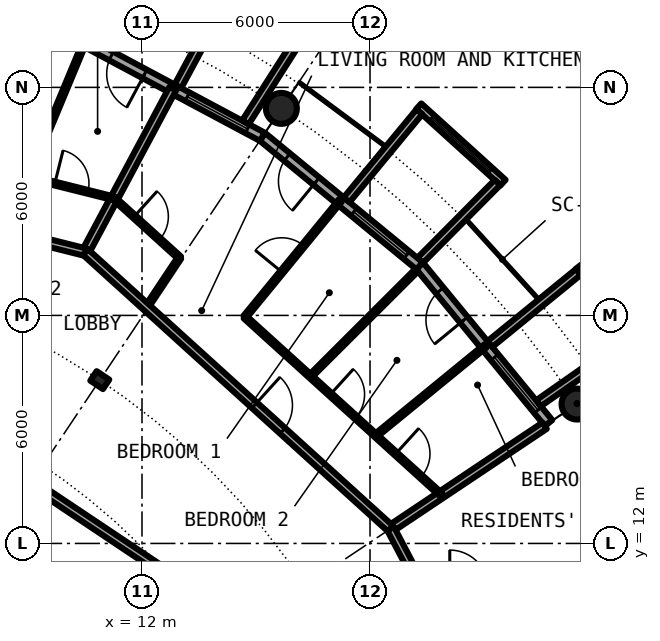
"""IFC4 building model, lengths in metres.
Left out: names, types, materials, properties, quantities, classifications, styles, units other than length and angle.
Written with IfcOpenShell. Run it as: python <this file> out.ifc"""

import sys

from ifc_helpers import new_model, si_unit, direction, frame, frame_2d, origin, origin_2d, place, context, subcontext, project, spatial, rectangle, circle, hollow_circle, i_section, extrude, element, fill, save


model = new_model("IFC4")
c1 = context("Model", 3, precision=1e-05, world=origin(), true_north=direction((0.0, 1.0)))
c2 = subcontext(c1, "Body", "Model", "MODEL_VIEW")
j1 = project(units=[si_unit("LENGTHUNIT", "METRE"), si_unit("PLANEANGLEUNIT", "RADIAN")], contexts=[c1])
p1 = place(None, origin())
s1 = spatial("IfcSite", under=j1, at=p1, CompositionType="ELEMENT")
p2 = place(p1, origin())
s2 = spatial("IfcBuilding", under=s1, at=p2, CompositionType="ELEMENT")
p3 = place(p2, frame((0.0, 0.0, 199.35)))
s3 = spatial("IfcBuildingStorey", under=s2, at=p3, CompositionType="ELEMENT", Elevation=199.35)
for number, where, z_axis, x_axis in (
    (1, (23.448, 15.667, 0.0), (0.0, 0.0, 1.0), (1.0, 0.0, 0.0)),
    (2, (15.667, 23.448, 0.0), (0.0, 0.0, 1.0), (1.0, 0.0, 0.0)),
):
    element("IfcColumn", number, at=place(p3, frame(where, z_axis=z_axis, x_axis=x_axis)), inside=s3, PredefinedType="COLUMN", context=c2, shape_type="SweptSolid", body=[
        extrude(hollow_circle(Radius=0.406, WallThickness=0.03, at=origin_2d()), origin(), (0.0, 0.0, 1.0), 3.05),
    ])
p4 = place(p3, frame((10.889, 16.297, 0.0), z_axis=(0.0, 0.0, 1.0), x_axis=(0.55557023302, 0.831469612303, 0.0)))
e3 = element("IfcColumn", 3, at=p4, inside=s3, PredefinedType="COLUMN", context=c2, shape_type="SweptSolid", body=[
    extrude(i_section(OverallWidth=0.3, OverallDepth=0.4, WebThickness=0.013, FlangeThickness=0.024, FilletRadius=0.027, at=origin_2d()), origin(), (0.0, 0.0, 1.0), 3.05),
])
p5 = place(p3, frame((22.699, 15.167, 0.0), z_axis=(0.0, 0.0, 1.0), x_axis=(-0.634382322723, 0.773019449054, 0.0)))
e4 = element("IfcWall", 4, at=p5, inside=s3, PredefinedType="SOLIDWALL", context=c2, shape_type="SweptSolid", body=[
    extrude(rectangle(XDim=5.352, YDim=0.25, at=frame_2d((2.676, 0.0))), origin(), (0.0, 0.0, 1.0), 2.7),
])
p6 = place(p5, frame((0.441, 0.0, 0.3)))
e5 = element("IfcOpeningElement", 5, at=p6, cuts=e4, PredefinedType="OPENING", context=c2, shape_type="SweptSolid", body=[
    extrude(rectangle(XDim=1.8, YDim=2.1, at=frame_2d((0.9, 1.05))), frame((0.0, 0.135, 0.0), z_axis=(0.0, -1.0, 0.0), x_axis=(1.0, 0.0, 0.0)), (0.0, 0.0, 1.0), 0.27),
])
p7 = place(p5, frame((3.51, 0.0, 0.0)))
e6 = element("IfcOpeningElement", 6, at=p7, cuts=e4, PredefinedType="OPENING", context=c2, shape_type="SweptSolid", body=[
    extrude(rectangle(XDim=1.0, YDim=2.2, at=frame_2d((0.5, 1.1))), frame((0.0, 0.135, 0.0), z_axis=(0.0, -1.0, 0.0), x_axis=(1.0, 0.0, 0.0)), (0.0, 0.0, 1.0), 0.27),
])
p8 = place(p3, frame((24.972, 17.337, -0.03), z_axis=(0.0, 0.0, 1.0), x_axis=(-0.602806268067, 0.797887588059, 0.0)))
e7 = element("IfcWall", 7, at=p8, inside=s3, PredefinedType="SOLIDWALL", context=c2, shape_type="SweptSolid", body=[
    extrude(rectangle(XDim=2.447, YDim=0.2, at=frame_2d((1.223, 0.0))), origin(), (0.0, 0.0, 1.0), 2.73),
])
p9 = place(p8, frame((0.183, 0.0, 0.33)))
e8 = element("IfcOpeningElement", 8, at=p9, cuts=e7, PredefinedType="OPENING", context=c2, shape_type="SweptSolid", body=[
    extrude(circle(Radius=1.04, at=frame_2d((1.04, 1.04))), frame((0.0, 0.11, 0.0), z_axis=(0.0, -1.0, 0.0), x_axis=(1.0, 0.0, 0.0)), (0.0, 0.0, 1.0), 0.22),
])
p10 = place(p3, frame((22.433, 15.688, -0.03), z_axis=(0.0, 0.0, 1.0), x_axis=(0.819373043115, 0.573260687834, 0.0)))
e9 = element("IfcWall", 9, at=p10, inside=s3, PredefinedType="SOLIDWALL", context=c2, shape_type="SweptSolid", body=[
    extrude(rectangle(XDim=2.925, YDim=0.2, at=frame_2d((1.463, 0.0))), origin(), (0.0, 0.0, 1.0), 2.73),
])
p11 = place(p3, frame((21.155, 17.246, -0.03), z_axis=(0.0, 0.0, 1.0), x_axis=(0.775179004516, 0.631741648902, 0.0)))
e10 = element("IfcWall", 10, at=p11, inside=s3, PredefinedType="SOLIDWALL", context=c2, shape_type="SweptSolid", body=[
    extrude(rectangle(XDim=3.006, YDim=0.2, at=frame_2d((1.503, 0.0))), origin(), (0.0, 0.0, 1.0), 2.73),
])
p12 = place(p3, frame((19.304, 19.304, 0.0), z_axis=(0.0, 0.0, 1.0), x_axis=(-0.773019449054, 0.634382322723, 0.0)))
e11 = element("IfcWall", 11, at=p12, inside=s3, PredefinedType="SOLIDWALL", context=c2, shape_type="SweptSolid", body=[
    extrude(rectangle(XDim=5.352, YDim=0.25, at=frame_2d((2.676, 0.0))), origin(), (0.0, 0.0, 1.0), 2.7),
])
p13 = place(p12, frame((0.441, 0.0, 0.3)))
e12 = element("IfcOpeningElement", 12, at=p13, cuts=e11, PredefinedType="OPENING", context=c2, shape_type="SweptSolid", body=[
    extrude(rectangle(XDim=1.8, YDim=2.1, at=frame_2d((0.9, 1.05))), frame((0.0, 0.135, 0.0), z_axis=(0.0, -1.0, 0.0), x_axis=(1.0, 0.0, 0.0)), (0.0, 0.0, 1.0), 0.27),
])
p14 = place(p12, frame((3.51, 0.0, 0.0)))
e13 = element("IfcOpeningElement", 13, at=p14, cuts=e11, PredefinedType="OPENING", context=c2, shape_type="SweptSolid", body=[
    extrude(rectangle(XDim=1.0, YDim=2.2, at=frame_2d((0.5, 1.1))), frame((0.0, 0.135, 0.0), z_axis=(0.0, -1.0, 0.0), x_axis=(1.0, 0.0, 0.0)), (0.0, 0.0, 1.0), 0.27),
])
p15 = place(p3, frame((21.5, 21.493, -0.03), z_axis=(0.0, 0.0, 1.0), x_axis=(-0.740998365753, 0.671506829416, 0.0)))
e14 = element("IfcWall", 14, at=p15, inside=s3, PredefinedType="SOLIDWALL", context=c2, shape_type="SweptSolid", body=[
    extrude(rectangle(XDim=2.993, YDim=0.2, at=frame_2d((1.497, 0.0))), origin(), (0.0, 0.0, 1.0), 2.73),
])
p16 = place(p15, frame((0.457, 0.0, 0.33)))
e15 = element("IfcOpeningElement", 15, at=p16, cuts=e14, PredefinedType="OPENING", context=c2, shape_type="SweptSolid", body=[
    extrude(circle(Radius=1.04, at=frame_2d((1.04, 1.04))), frame((0.0, 0.11, 0.0), z_axis=(0.0, -1.0, 0.0), x_axis=(1.0, 0.0, 0.0)), (0.0, 0.0, 1.0), 0.22),
])
p17 = place(p3, frame((19.323, 19.45, -0.03), z_axis=(0.0, 0.0, 1.0), x_axis=(0.704476739375, 0.709727076896, 0.0)))
e16 = element("IfcWall", 16, at=p17, inside=s3, PredefinedType="SOLIDWALL", context=c2, shape_type="SweptSolid", body=[
    extrude(rectangle(XDim=2.883, YDim=0.2, at=frame_2d((1.441, 0.0))), origin(), (0.0, 0.0, 1.0), 2.73),
])
p18 = place(p3, frame((17.384, 21.041, -0.03), z_axis=(0.0, 0.0, 1.0), x_axis=(0.63709551667, 0.770784861449, 0.0)))
e17 = element("IfcWall", 17, at=p18, inside=s3, PredefinedType="SOLIDWALL", context=c2, shape_type="SweptSolid", body=[
    extrude(rectangle(XDim=3.006, YDim=0.2, at=frame_2d((1.503, 0.0))), origin(), (0.0, 0.0, 1.0), 2.73),
])
p19 = place(p3, frame((15.167, 22.699, 0.0), z_axis=(0.0, 0.0, 1.0), x_axis=(-0.881915646801, 0.471407246368, 0.0)))
e18 = element("IfcWall", 18, at=p19, inside=s3, PredefinedType="SOLIDWALL", context=c2, shape_type="SweptSolid", body=[
    extrude(rectangle(XDim=5.352, YDim=0.25, at=frame_2d((2.676, 0.0))), origin(), (0.0, 0.0, 1.0), 2.7),
])
p20 = place(p19, frame((0.441, 0.0, 0.3)))
e19 = element("IfcOpeningElement", 19, at=p20, cuts=e18, PredefinedType="OPENING", context=c2, shape_type="SweptSolid", body=[
    extrude(rectangle(XDim=1.8, YDim=2.1, at=frame_2d((0.9, 1.05))), frame((0.0, 0.135, 0.0), z_axis=(0.0, -1.0, 0.0), x_axis=(1.0, 0.0, 0.0)), (0.0, 0.0, 1.0), 0.27),
])
p21 = place(p19, frame((3.51, 0.0, 0.0)))
e20 = element("IfcOpeningElement", 20, at=p21, cuts=e18, PredefinedType="OPENING", context=c2, shape_type="SweptSolid", body=[
    extrude(rectangle(XDim=1.0, YDim=2.2, at=frame_2d((0.5, 1.1))), frame((0.0, 0.135, 0.0), z_axis=(0.0, -1.0, 0.0), x_axis=(1.0, 0.0, 0.0)), (0.0, 0.0, 1.0), 0.27),
])
p22 = place(p3, frame((14.722, 23.079, -0.03), z_axis=(0.0, 0.0, 1.0), x_axis=(0.537572179146, 0.843217737129, 0.0)))
e21 = element("IfcWall", 21, at=p22, inside=s3, PredefinedType="SOLIDWALL", context=c2, shape_type="SweptSolid", body=[
    extrude(rectangle(XDim=2.924, YDim=0.2, at=frame_2d((1.462, 0.0))), origin(), (0.0, 0.0, 1.0), 2.73),
])
p23 = place(p3, frame((12.945, 24.029, -0.03), z_axis=(0.0, 0.0, 1.0), x_axis=(0.474424310775, 0.88029629861, 0.0)))
e22 = element("IfcWall", 22, at=p23, inside=s3, PredefinedType="SOLIDWALL", context=c2, shape_type="SweptSolid", body=[
    extrude(rectangle(XDim=3.006, YDim=0.2, at=frame_2d((1.503, 0.0))), origin(), (0.0, 0.0, 1.0), 2.73),
])
p24 = place(p3, frame((9.013, 21.642, 0.0), z_axis=(0.0, 0.0, 1.0), x_axis=(0.384420204655, 0.923158223845, 0.0)))
e23 = element("IfcWall", 23, at=p24, inside=s3, PredefinedType="PARTITIONING", context=c2, shape_type="SweptSolid", body=[
    extrude(rectangle(XDim=3.73, YDim=0.1, at=frame_2d((1.865, 0.0))), origin(), (0.0, 0.0, 1.0), 2.7),
])
p25 = place(p3, frame((10.512, 19.667, 0.0), z_axis=(0.0, 0.0, 1.0), x_axis=(0.471271812246, 0.881988026553, 0.0)))
e24 = element("IfcWall", 24, at=p25, inside=s3, PredefinedType="PARTITIONING", context=c2, shape_type="SweptSolid", body=[
    extrude(rectangle(XDim=4.874, YDim=0.2, at=frame_2d((2.437, 0.0))), origin(), (0.0, 0.0, 1.0), 2.7),
])
p26 = place(p3, frame((12.118, 18.211, 0.0), z_axis=(0.0, 0.0, 1.0), x_axis=(0.554125989098, 0.832432813028, 0.0)))
e25 = element("IfcWall", 25, at=p26, inside=s3, PredefinedType="PARTITIONING", context=c2, shape_type="SweptSolid", body=[
    extrude(rectangle(XDim=1.57, YDim=0.1, at=frame_2d((0.785, 0.0))), origin(), (0.0, 0.0, 1.0), 2.7),
])
p27 = place(p3, frame((14.709, 17.958, 0.0), z_axis=(0.0, 0.0, 1.0), x_axis=(0.633590098448, 0.773668913133, 0.0)))
e26 = element("IfcWall", 26, at=p27, inside=s3, PredefinedType="PARTITIONING", context=c2, shape_type="SweptSolid", body=[
    extrude(rectangle(XDim=3.962, YDim=0.1, at=frame_2d((1.981, 0.0))), origin(), (0.0, 0.0, 1.0), 2.7),
])
p28 = place(p27, frame((1.531, 0.0, 0.0)))
e27 = element("IfcOpeningElement", 27, at=p28, cuts=e26, PredefinedType="OPENING", context=c2, shape_type="SweptSolid", body=[
    extrude(rectangle(XDim=0.9, YDim=2.3, at=frame_2d((0.45, 1.15))), frame((0.0, 0.06, 0.0), z_axis=(0.0, -1.0, 0.0), x_axis=(1.0, 0.0, 0.0)), (0.0, 0.0, 1.0), 0.12),
])
p29 = place(p3, frame((16.43, 16.398, 0.0), z_axis=(0.0, 0.0, 1.0), x_axis=(0.707722727509, 0.706490297858, 0.0)))
e28 = element("IfcWall", 28, at=p29, inside=s3, PredefinedType="PARTITIONING", context=c2, shape_type="SweptSolid", body=[
    extrude(rectangle(XDim=3.962, YDim=0.1, at=frame_2d((1.981, 0.0))), origin(), (0.0, 0.0, 1.0), 2.7),
])
p30 = place(p3, frame((18.151, 14.838, 0.0), z_axis=(0.0, 0.0, 1.0), x_axis=(0.774321581607, 0.63279229472, 0.0)))
e29 = element("IfcWall", 29, at=p30, inside=s3, PredefinedType="PARTITIONING", context=c2, shape_type="SweptSolid", body=[
    extrude(rectangle(XDim=3.731, YDim=0.1, at=frame_2d((1.866, 0.0))), origin(), (0.0, 0.0, 1.0), 2.7),
])
p31 = place(p3, frame((18.542, 12.389, 0.0), z_axis=(0.0, 0.0, 1.0), x_axis=(0.831387096605, 0.55569370664, 0.0)))
e30 = element("IfcWall", 30, at=p31, inside=s3, PredefinedType="PARTITIONING", context=c2, shape_type="SweptSolid", body=[
    extrude(rectangle(XDim=4.875, YDim=0.2, at=frame_2d((2.438, 0.0))), origin(), (0.0, 0.0, 1.0), 2.7),
])
p32 = place(p3, frame((3.453, 17.36, 0.0), z_axis=(0.0, 0.0, 1.0), x_axis=(0.831437137577, -0.555618831806, 0.0)))
e31 = element("IfcWall", 31, at=p32, inside=s3, PredefinedType="PARTITIONING", context=c2, shape_type="SweptSolid", body=[
    extrude(rectangle(XDim=13.549, YDim=0.2, at=frame_2d((6.774, 0.0))), origin(), (0.0, 0.0, 1.0), 2.7),
])
p33 = place(p32, frame((4.581, 0.0, 0.0)))
e32 = element("IfcOpeningElement", 32, at=p33, cuts=e31, PredefinedType="OPENING", context=c2, shape_type="SweptSolid", body=[
    extrude(rectangle(XDim=1.0, YDim=2.3, at=frame_2d((0.5, 1.15))), frame((0.0, 0.11, 0.0), z_axis=(0.0, -1.0, 0.0), x_axis=(1.0, 0.0, 0.0)), (0.0, 0.0, 1.0), 0.22),
])
p34 = place(p3, frame((0.0, 22.3, 0.0), z_axis=(0.0, 0.0, 1.0), x_axis=(0.969975381822, -0.243203122222, 0.0)))
e33 = element("IfcWall", 33, at=p34, inside=s3, PredefinedType="PARTITIONING", context=c2, shape_type="SweptSolid", body=[
    extrude(rectangle(XDim=10.843, YDim=0.2, at=frame_2d((5.421, 0.0))), origin(), (0.0, 0.0, 1.0), 2.7),
])
p35 = place(p34, frame((6.002, 0.0, 0.0)))
e34 = element("IfcOpeningElement", 34, at=p35, cuts=e33, PredefinedType="OPENING", context=c2, shape_type="SweptSolid", body=[
    extrude(rectangle(XDim=1.0, YDim=2.3, at=frame_2d((0.5, 1.15))), frame((0.0, 0.11, 0.0), z_axis=(0.0, -1.0, 0.0), x_axis=(1.0, 0.0, 0.0)), (0.0, 0.0, 1.0), 0.22),
])
p36 = place(p3, frame((10.512, 19.667, 0.0), z_axis=(0.0, 0.0, 1.0), x_axis=(0.740849323054, -0.67167125927, 0.0)))
e35 = element("IfcWall", 35, at=p36, inside=s3, PredefinedType="PARTITIONING", context=c2, shape_type="SweptSolid", body=[
    extrude(rectangle(XDim=10.842, YDim=0.2, at=frame_2d((5.421, 0.0))), origin(), (0.0, 0.0, 1.0), 2.7),
])
p37 = place(p36, frame((6.003, 0.0, 0.0)))
e36 = element("IfcOpeningElement", 36, at=p37, cuts=e35, PredefinedType="OPENING", context=c2, shape_type="SweptSolid", body=[
    extrude(rectangle(XDim=1.0, YDim=2.3, at=frame_2d((0.5, 1.15))), frame((0.0, 0.11, 0.0), z_axis=(0.0, -1.0, 0.0), x_axis=(1.0, 0.0, 0.0)), (0.0, 0.0, 1.0), 0.22),
])
p38 = place(p3, frame((18.542, 12.389, 0.0), z_axis=(0.0, 0.0, 1.0), x_axis=(0.465359652486, -0.885121683068, 0.0)))
e37 = element("IfcWall", 37, at=p38, inside=s3, PredefinedType="PARTITIONING", context=c2, shape_type="SweptSolid", body=[
    extrude(rectangle(XDim=1.665, YDim=0.2, at=frame_2d((0.833, 0.0))), origin(), (0.0, 0.0, 1.0), 2.7),
])
p39 = place(p3, frame((4.507, 22.771, 0.0), z_axis=(0.0, 0.0, 1.0), x_axis=(0.970020829306, -0.243021790611, 0.0)))
e38 = element("IfcWall", 38, at=p39, inside=s3, PredefinedType="PARTITIONING", context=c2, shape_type="SweptSolid", body=[
    extrude(rectangle(XDim=6.971, YDim=0.1, at=frame_2d((3.485, 0.0))), origin(), (0.0, 0.0, 1.0), 2.7),
])
p40 = place(p39, frame((3.031, 0.0, 0.0)))
e39 = element("IfcOpeningElement", 39, at=p40, cuts=e38, PredefinedType="OPENING", context=c2, shape_type="SweptSolid", body=[
    extrude(rectangle(XDim=0.9, YDim=2.3, at=frame_2d((0.45, 1.15))), frame((0.0, 0.06, 0.0), z_axis=(0.0, -1.0, 0.0), x_axis=(1.0, 0.0, 0.0)), (0.0, 0.0, 1.0), 0.12),
])
p41 = place(p39, frame((5.358, 0.0, 0.0)))
e40 = element("IfcOpeningElement", 40, at=p41, cuts=e38, PredefinedType="OPENING", context=c2, shape_type="SweptSolid", body=[
    extrude(rectangle(XDim=0.9, YDim=2.3, at=frame_2d((0.45, 1.15))), frame((0.0, 0.06, 0.0), z_axis=(0.0, -1.0, 0.0), x_axis=(1.0, 0.0, 0.0)), (0.0, 0.0, 1.0), 0.12),
])
p42 = place(p3, frame((11.271, 21.074, 0.0), z_axis=(0.0, 0.0, 1.0), x_axis=(0.74087097024, -0.671647381783, 0.0)))
e41 = element("IfcWall", 41, at=p42, inside=s3, PredefinedType="PARTITIONING", context=c2, shape_type="SweptSolid", body=[
    extrude(rectangle(XDim=2.324, YDim=0.1, at=frame_2d((1.162, 0.0))), origin(), (0.0, 0.0, 1.0), 2.7),
])
p43 = place(p42, frame((0.705, 0.0, 0.0)))
e42 = element("IfcOpeningElement", 42, at=p43, cuts=e41, PredefinedType="OPENING", context=c2, shape_type="SweptSolid", body=[
    extrude(rectangle(XDim=0.9, YDim=2.3, at=frame_2d((0.45, 1.15))), frame((0.0, 0.06, 0.0), z_axis=(0.0, -1.0, 0.0), x_axis=(1.0, 0.0, 0.0)), (0.0, 0.0, 1.0), 0.12),
])
p44 = place(p3, frame((14.709, 17.958, 0.0), z_axis=(0.0, 0.0, 1.0), x_axis=(0.740923753351, -0.671589153962, 0.0)))
e43 = element("IfcWall", 43, at=p44, inside=s3, PredefinedType="PARTITIONING", context=c2, shape_type="SweptSolid", body=[
    extrude(rectangle(XDim=6.969, YDim=0.1, at=frame_2d((3.484, 0.0))), origin(), (0.0, 0.0, 1.0), 2.7),
])
p45 = place(p44, frame((3.034, 0.0, 0.0)))
e44 = element("IfcOpeningElement", 44, at=p45, cuts=e43, PredefinedType="OPENING", context=c2, shape_type="SweptSolid", body=[
    extrude(rectangle(XDim=0.9, YDim=2.3, at=frame_2d((0.45, 1.15))), frame((0.0, 0.06, 0.0), z_axis=(0.0, -1.0, 0.0), x_axis=(1.0, 0.0, 0.0)), (0.0, 0.0, 1.0), 0.12),
])
p46 = place(p44, frame((5.357, 0.0, 0.0)))
e45 = element("IfcOpeningElement", 45, at=p46, cuts=e43, PredefinedType="OPENING", context=c2, shape_type="SweptSolid", body=[
    extrude(rectangle(XDim=0.9, YDim=2.3, at=frame_2d((0.45, 1.15))), frame((0.0, 0.06, 0.0), z_axis=(0.0, -1.0, 0.0), x_axis=(1.0, 0.0, 0.0)), (0.0, 0.0, 1.0), 0.12),
])
p47 = place(p6, origin())
e46 = element("IfcWindow", 46, at=p47, inside=s3, PartitioningType="SINGLE_PANEL", PredefinedType="WINDOW", context=c2, shape_type="SweptSolid", body=[
    extrude(rectangle(XDim=1.8, YDim=2.1, at=frame_2d((0.9, 1.05))), frame((0.0, 0.03, 0.0), z_axis=(0.0, -1.0, 0.0), x_axis=(1.0, 0.0, 0.0)), (0.0, 0.0, 1.0), 0.06),
])
fill(e5, e46)
p48 = place(p7, origin())
e47 = element("IfcDoor", 47, at=p48, inside=s3, OperationType="SINGLE_SWING_LEFT", PredefinedType="DOOR", context=c2, shape_type="SweptSolid", body=[
    extrude(rectangle(XDim=1.0, YDim=2.2, at=frame_2d((0.5, 1.1))), frame((0.0, 0.025, 0.0), z_axis=(0.0, -1.0, 0.0), x_axis=(1.0, 0.0, 0.0)), (0.0, 0.0, 1.0), 0.05),
])
fill(e6, e47)
p49 = place(p13, origin())
e48 = element("IfcWindow", 48, at=p49, inside=s3, PartitioningType="SINGLE_PANEL", PredefinedType="WINDOW", context=c2, shape_type="SweptSolid", body=[
    extrude(rectangle(XDim=1.8, YDim=2.1, at=frame_2d((0.9, 1.05))), frame((0.0, 0.03, 0.0), z_axis=(0.0, -1.0, 0.0), x_axis=(1.0, 0.0, 0.0)), (0.0, 0.0, 1.0), 0.06),
])
fill(e12, e48)
p50 = place(p16, origin())
e49 = element("IfcWindow", 49, at=p50, inside=s3, PartitioningType="SINGLE_PANEL", PredefinedType="WINDOW", context=c2, shape_type="SweptSolid", body=[
    extrude(circle(Radius=1.04, at=frame_2d((1.04, 1.04))), frame((0.0, 0.03, 0.0), z_axis=(0.0, -1.0, 0.0), x_axis=(1.0, 0.0, 0.0)), (0.0, 0.0, 1.0), 0.06),
])
fill(e15, e49)
p51 = place(p14, origin())
e50 = element("IfcDoor", 50, at=p51, inside=s3, OperationType="SINGLE_SWING_LEFT", PredefinedType="DOOR", context=c2, shape_type="SweptSolid", body=[
    extrude(rectangle(XDim=1.0, YDim=2.2, at=frame_2d((0.5, 1.1))), frame((0.0, 0.025, 0.0), z_axis=(0.0, -1.0, 0.0), x_axis=(1.0, 0.0, 0.0)), (0.0, 0.0, 1.0), 0.05),
])
fill(e13, e50)
p52 = place(p20, origin())
e51 = element("IfcWindow", 51, at=p52, inside=s3, PartitioningType="SINGLE_PANEL", PredefinedType="WINDOW", context=c2, shape_type="SweptSolid", body=[
    extrude(rectangle(XDim=1.8, YDim=2.1, at=frame_2d((0.9, 1.05))), frame((0.0, 0.03, 0.0), z_axis=(0.0, -1.0, 0.0), x_axis=(1.0, 0.0, 0.0)), (0.0, 0.0, 1.0), 0.06),
])
fill(e19, e51)
p53 = place(p21, origin())
e52 = element("IfcDoor", 52, at=p53, inside=s3, OperationType="SINGLE_SWING_LEFT", PredefinedType="DOOR", context=c2, shape_type="SweptSolid", body=[
    extrude(rectangle(XDim=1.0, YDim=2.2, at=frame_2d((0.5, 1.1))), frame((0.0, 0.025, 0.0), z_axis=(0.0, -1.0, 0.0), x_axis=(1.0, 0.0, 0.0)), (0.0, 0.0, 1.0), 0.05),
])
fill(e20, e52)
p54 = place(p37, origin())
e53 = element("IfcDoor", 53, at=p54, inside=s3, OperationType="SINGLE_SWING_RIGHT", PredefinedType="DOOR", context=c2, shape_type="SweptSolid", body=[
    extrude(rectangle(XDim=1.0, YDim=2.3, at=frame_2d((0.5, 1.15))), frame((0.0, 0.025, 0.0), z_axis=(0.0, -1.0, 0.0), x_axis=(1.0, 0.0, 0.0)), (0.0, 0.0, 1.0), 0.05),
])
fill(e36, e53)
p55 = place(p43, origin())
e54 = element("IfcDoor", 54, at=p55, inside=s3, OperationType="SINGLE_SWING_LEFT", PredefinedType="DOOR", context=c2, shape_type="SweptSolid", body=[
    extrude(rectangle(XDim=0.9, YDim=2.3, at=frame_2d((0.45, 1.15))), frame((0.0, 0.025, 0.0), z_axis=(0.0, -1.0, 0.0), x_axis=(1.0, 0.0, 0.0)), (0.0, 0.0, 1.0), 0.05),
])
fill(e42, e54)
p56 = place(p28, origin())
e55 = element("IfcDoor", 55, at=p56, inside=s3, OperationType="SINGLE_SWING_RIGHT", PredefinedType="DOOR", context=c2, shape_type="SweptSolid", body=[
    extrude(rectangle(XDim=0.9, YDim=2.3, at=frame_2d((0.45, 1.15))), frame((0.0, 0.025, 0.0), z_axis=(0.0, -1.0, 0.0), x_axis=(1.0, 0.0, 0.0)), (0.0, 0.0, 1.0), 0.05),
])
fill(e27, e55)
p57 = place(p45, origin())
e56 = element("IfcDoor", 56, at=p57, inside=s3, OperationType="SINGLE_SWING_LEFT", PredefinedType="DOOR", context=c2, shape_type="SweptSolid", body=[
    extrude(rectangle(XDim=0.9, YDim=2.3, at=frame_2d((0.45, 1.15))), frame((0.0, 0.025, 0.0), z_axis=(0.0, -1.0, 0.0), x_axis=(1.0, 0.0, 0.0)), (0.0, 0.0, 1.0), 0.05),
])
fill(e44, e56)
p58 = place(p46, origin())
e57 = element("IfcDoor", 57, at=p58, inside=s3, OperationType="SINGLE_SWING_RIGHT", PredefinedType="DOOR", context=c2, shape_type="SweptSolid", body=[
    extrude(rectangle(XDim=0.9, YDim=2.3, at=frame_2d((0.45, 1.15))), frame((0.0, 0.025, 0.0), z_axis=(0.0, -1.0, 0.0), x_axis=(1.0, 0.0, 0.0)), (0.0, 0.0, 1.0), 0.05),
])
fill(e45, e57)
p59 = place(p41, origin())
e58 = element("IfcDoor", 58, at=p59, inside=s3, OperationType="SINGLE_SWING_RIGHT", PredefinedType="DOOR", context=c2, shape_type="SweptSolid", body=[
    extrude(rectangle(XDim=0.9, YDim=2.3, at=frame_2d((0.45, 1.15))), frame((0.0, 0.025, 0.0), z_axis=(0.0, -1.0, 0.0), x_axis=(1.0, 0.0, 0.0)), (0.0, 0.0, 1.0), 0.05),
])
fill(e40, e58)
save(model, sys.argv[1])
